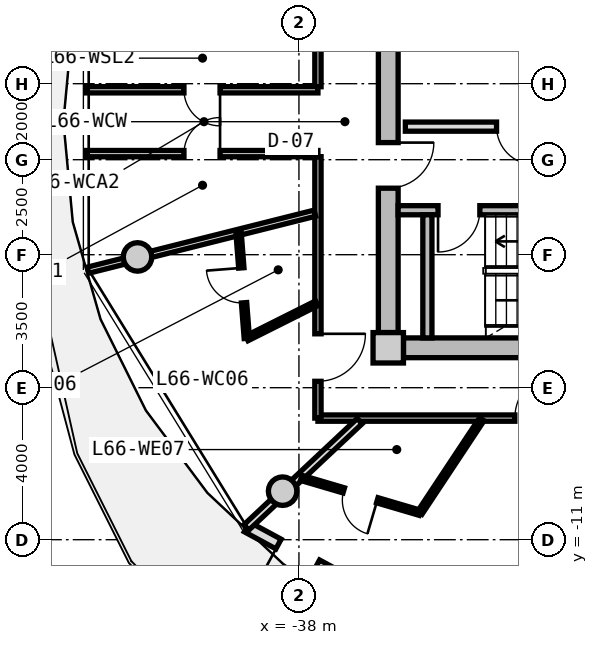
"""IFC4 building model, lengths in metres.
Left out: names, types, materials, properties, quantities, classifications, styles, units other than length and angle.
Written with IfcOpenShell. Run it as: python <this file> out.ifc"""

import sys

from ifc_helpers import new_model, si_unit, direction, frame, frame_2d, origin, origin_2d, place, context, subcontext, project, spatial, rectangle, circle, extrude, source, transform, mapped, element, fill, save


model = new_model("IFC4")
c1 = context("Model", 3, precision=1e-05, world=origin(), true_north=direction((0.0, 1.0)))
c2 = subcontext(c1, "Body", "Model", "MODEL_VIEW")
j1 = project(units=[si_unit("LENGTHUNIT", "METRE"), si_unit("PLANEANGLEUNIT", "RADIAN")], contexts=[c1])
p1 = place(None, origin())
s1 = spatial("IfcSite", under=j1, at=p1, CompositionType="ELEMENT")
p2 = place(p1, origin())
s2 = spatial("IfcBuilding", under=s1, at=p2, CompositionType="ELEMENT")
p3 = place(p2, frame((0.0, 0.0, 213.9)))
s3 = spatial("IfcBuildingStorey", under=s2, at=p3, CompositionType="ELEMENT", Elevation=213.9)
m1 = source(origin(), c2, "Body", "SweptSolid", [
    extrude(rectangle(XDim=0.8, YDim=0.8, at=origin_2d()), origin(), (0.0, 0.0, 1.0), 3.05),
])
p4 = place(p3, frame((-35.65, -5.95, 0.0), z_axis=(0.0, 0.0, 1.0), x_axis=(1.0, 0.0, 0.0)))
e1 = element("IfcColumn", 1, at=p4, inside=s3, PredefinedType="COLUMN", context=c2, shape_type="MappedRepresentation", body=[
    mapped(m1, transform((0.0, 0.0, 0.0), x_axis=(1.0, 0.0, 0.0), y_axis=(0.0, 1.0, 0.0), z_axis=(0.0, 0.0, 1.0), scale=1.0)),
])
m2 = source(origin(), c2, "Body", "SweptSolid", [
    extrude(rectangle(XDim=14.5, YDim=0.52, at=frame_2d((7.25, 0.0))), origin(), (0.0, 0.0, 1.0), 2.76),
])
p5 = place(p3, frame((-20.75, -5.95, 0.0), z_axis=(0.0, 0.0, 1.0), x_axis=(-1.0, 0.0, 0.0)))
e2 = element("IfcWall", 2, at=p5, inside=s3, PredefinedType="SHEAR", context=c2, shape_type="MappedRepresentation", body=[
    mapped(m2, transform((0.0, 0.0, 0.0), x_axis=(1.0, 0.0, 0.0), y_axis=(0.0, 1.0, 0.0), z_axis=(0.0, 0.0, 1.0), scale=1.0)),
])
m3 = source(origin(), c2, "Body", "SweptSolid", [
    extrude(rectangle(XDim=11.1, YDim=0.52, at=frame_2d((5.55, 0.0))), origin(), (0.0, 0.0, 1.0), 2.76),
])
p6 = place(p3, frame((-35.65, -5.55, 0.0), z_axis=(0.0, 0.0, 1.0), x_axis=(0.0, 1.0, 0.0)))
e3 = element("IfcWall", 3, at=p6, inside=s3, PredefinedType="SHEAR", context=c2, shape_type="MappedRepresentation", body=[
    mapped(m3, transform((0.0, 0.0, 0.0), x_axis=(1.0, 0.0, 0.0), y_axis=(0.0, 1.0, 0.0), z_axis=(0.0, 0.0, 1.0), scale=1.0)),
])
p7 = place(p6, frame((3.8, 0.0, 0.0)))
e4 = element("IfcOpeningElement", 4, at=p7, cuts=e3, PredefinedType="OPENING", context=c2, shape_type="SweptSolid", body=[
    extrude(rectangle(XDim=1.2, YDim=2.15, at=frame_2d((0.6, 1.075))), frame((0.0, 0.27, 0.0), z_axis=(0.0, -1.0, 0.0), x_axis=(1.0, 0.0, 0.0)), (0.0, 0.0, 1.0), 0.54),
])
m4 = source(origin(), c2, "Body", "SweptSolid", [
    extrude(circle(Radius=0.375, at=origin_2d()), origin(), (0.0, 0.0, 1.0), 3.05),
])
for number, where, z_axis, x_axis in (
    (5, (-42.247, -3.559, 0.0), (0.0, 0.0, 1.0), (1.0, 0.0, 0.0)),
    (6, (-38.43, -9.723, 0.0), (0.0, 0.0, 1.0), (1.0, 0.0, 0.0)),
):
    element("IfcColumn", number, at=place(p3, frame(where, z_axis=z_axis, x_axis=x_axis)), inside=s3, PredefinedType="COLUMN", context=c2, shape_type="MappedRepresentation", body=[
        mapped(m4, transform((0.0, 0.0, 0.0), x_axis=(1.0, 0.0, 0.0), y_axis=(0.0, 1.0, 0.0), z_axis=(0.0, 0.0, 1.0), scale=1.0)),
    ])
m5 = source(origin(), c2, "Body", "SweptSolid", [
    extrude(rectangle(XDim=8.197, YDim=0.29, at=frame_2d((4.099, 0.0))), origin(), (0.0, 0.0, 1.0), 2.76),
])
p8 = place(p3, frame((-32.162, -14.566, 0.0), z_axis=(0.0, 0.0, 1.0), x_axis=(-0.879369910001, 0.476139224791, 0.0)))
e7 = element("IfcWall", 7, at=p8, inside=s3, PredefinedType="SOLIDWALL", context=c2, shape_type="MappedRepresentation", body=[
    mapped(m5, transform((0.0, 0.0, 0.0), x_axis=(1.0, 0.0, 0.0), y_axis=(0.0, 1.0, 0.0), z_axis=(0.0, 0.0, 1.0), scale=1.0)),
])
p9 = place(p8, frame((6.1, 0.0, 0.0)))
e8 = element("IfcOpeningElement", 8, at=p9, cuts=e7, PredefinedType="OPENING", context=c2, shape_type="SweptSolid", body=[
    extrude(rectangle(XDim=1.15, YDim=2.25, at=frame_2d((0.575, 1.125))), frame((0.0, 0.155, 0.0), z_axis=(0.0, -1.0, 0.0), x_axis=(1.0, 0.0, 0.0)), (0.0, 0.0, 1.0), 0.31),
])
p10 = place(p8, frame((0.85, 0.0, 0.85)))
e9 = element("IfcOpeningElement", 9, at=p10, cuts=e7, PredefinedType="OPENING", context=c2, shape_type="SweptSolid", body=[
    extrude(rectangle(XDim=1.2, YDim=1.5, at=frame_2d((0.6, 0.75))), frame((0.0, 0.155, 0.0), z_axis=(0.0, -1.0, 0.0), x_axis=(1.0, 0.0, 0.0)), (0.0, 0.0, 1.0), 0.31),
])
m6 = source(origin(), c2, "Body", "SweptSolid", [
    extrude(rectangle(XDim=7.93, YDim=0.24, at=frame_2d((3.965, 0.0))), origin(), (0.0, 0.0, 1.0), 2.76),
])
p11 = place(p3, frame((-35.39, -2.33, 0.0), z_axis=(0.0, 0.0, 1.0), x_axis=(1.0, 0.0, 0.0)))
e10 = element("IfcWall", 10, at=p11, inside=s3, PredefinedType="PARTITIONING", context=c2, shape_type="MappedRepresentation", body=[
    mapped(m6, transform((0.0, 0.0, 0.0), x_axis=(1.0, 0.0, 0.0), y_axis=(0.0, 1.0, 0.0), z_axis=(0.0, 0.0, 1.0), scale=1.0)),
])
p12 = place(p11, frame((1.05, 0.0, 0.0)))
e11 = element("IfcOpeningElement", 11, at=p12, cuts=e10, PredefinedType="OPENING", context=c2, shape_type="SweptSolid", body=[
    extrude(rectangle(XDim=1.1, YDim=2.15, at=frame_2d((0.55, 1.075))), frame((0.0, 0.13, 0.0), z_axis=(0.0, -1.0, 0.0), x_axis=(1.0, 0.0, 0.0)), (0.0, 0.0, 1.0), 0.26),
])
m7 = source(origin(), c2, "Body", "SweptSolid", [
    extrude(rectangle(XDim=3.24, YDim=0.24, at=frame_2d((1.62, 0.0))), origin(), (0.0, 0.0, 1.0), 2.76),
])
p13 = place(p3, frame((-34.62, -5.69, 0.0), z_axis=(0.0, 0.0, 1.0), x_axis=(0.0, 1.0, 0.0)))
e12 = element("IfcWall", 12, at=p13, inside=s3, PredefinedType="PARTITIONING", context=c2, shape_type="MappedRepresentation", body=[
    mapped(m7, transform((0.0, 0.0, 0.0), x_axis=(1.0, 0.0, 0.0), y_axis=(0.0, 1.0, 0.0), z_axis=(0.0, 0.0, 1.0), scale=1.0)),
])
m8 = source(origin(), c2, "Body", "SweptSolid", [
    extrude(rectangle(XDim=7.62, YDim=0.24, at=frame_2d((3.81, 0.0))), origin(), (0.0, 0.0, 1.0), 2.745),
])
p14 = place(p3, frame((-35.2, -0.13, 0.0), z_axis=(0.0, 0.0, 1.0), x_axis=(1.0, 0.0, 0.0)))
e13 = element("IfcWall", 13, at=p14, inside=s3, PredefinedType="PARTITIONING", context=c2, shape_type="MappedRepresentation", body=[
    mapped(m8, transform((0.0, 0.0, 0.0), x_axis=(1.0, 0.0, 0.0), y_axis=(0.0, 1.0, 0.0), z_axis=(0.0, 0.0, 1.0), scale=1.0)),
])
p15 = place(p14, frame((6.22, 0.0, 0.0)))
e14 = element("IfcOpeningElement", 14, at=p15, cuts=e13, PredefinedType="OPENING", context=c2, shape_type="SweptSolid", body=[
    extrude(rectangle(XDim=1.0, YDim=2.1, at=frame_2d((0.5, 1.05))), frame((0.0, 0.13, 0.0), z_axis=(0.0, -1.0, 0.0), x_axis=(1.0, 0.0, 0.0)), (0.0, 0.0, 1.0), 0.26),
])
p16 = place(p14, frame((2.4, 0.0, 0.0)))
e15 = element("IfcOpeningElement", 15, at=p16, cuts=e13, PredefinedType="OPENING", context=c2, shape_type="SweptSolid", body=[
    extrude(rectangle(XDim=1.0, YDim=2.1, at=frame_2d((0.5, 1.05))), frame((0.0, 0.13, 0.0), z_axis=(0.0, -1.0, 0.0), x_axis=(1.0, 0.0, 0.0)), (0.0, 0.0, 1.0), 0.26),
])
m9 = source(origin(), c2, "Body", "SweptSolid", [
    extrude(rectangle(XDim=19.0, YDim=0.165, at=frame_2d((9.5, 0.0))), origin(), (0.0, 0.0, 1.0), 2.745),
])
p17 = place(p3, frame((-18.5, -7.8, 0.0), z_axis=(0.0, 0.0, 1.0), x_axis=(-1.0, 0.0, 0.0)))
e16 = element("IfcWall", 16, at=p17, inside=s3, PredefinedType="PARTITIONING", context=c2, shape_type="MappedRepresentation", body=[
    mapped(m9, transform((0.0, 0.0, 0.0), x_axis=(1.0, 0.0, 0.0), y_axis=(0.0, 1.0, 0.0), z_axis=(0.0, 0.0, 1.0), scale=1.0)),
])
p18 = place(p17, frame((12.569, 0.0, 0.0)))
e17 = element("IfcOpeningElement", 17, at=p18, cuts=e16, PredefinedType="OPENING", context=c2, shape_type="SweptSolid", body=[
    extrude(rectangle(XDim=1.25, YDim=2.2, at=frame_2d((0.625, 1.1))), frame((0.0, 0.093, 0.0), z_axis=(0.0, -1.0, 0.0), x_axis=(1.0, 0.0, 0.0)), (0.0, 0.0, 1.0), 0.185),
])
p19 = place(p17, frame((8.875, 0.0, 0.0)))
e18 = element("IfcOpeningElement", 18, at=p19, cuts=e16, PredefinedType="OPENING", context=c2, shape_type="SweptSolid", body=[
    extrude(rectangle(XDim=1.25, YDim=2.2, at=frame_2d((0.625, 1.1))), frame((0.0, 0.093, 0.0), z_axis=(0.0, -1.0, 0.0), x_axis=(1.0, 0.0, 0.0)), (0.0, 0.0, 1.0), 0.185),
])
p20 = place(p17, frame((3.559, 0.0, 0.0)))
e19 = element("IfcOpeningElement", 19, at=p20, cuts=e16, PredefinedType="OPENING", context=c2, shape_type="SweptSolid", body=[
    extrude(rectangle(XDim=1.25, YDim=2.2, at=frame_2d((0.625, 1.1))), frame((0.0, 0.093, 0.0), z_axis=(0.0, -1.0, 0.0), x_axis=(1.0, 0.0, 0.0)), (0.0, 0.0, 1.0), 0.185),
])
m10 = source(origin(), c2, "Body", "SweptSolid", [
    extrude(rectangle(XDim=6.88, YDim=0.165, at=frame_2d((3.44, 0.0))), origin(), (0.0, 0.0, 1.0), 2.745),
])
p21 = place(p3, frame((-37.5, -7.8, 0.0), z_axis=(0.0, 0.0, 1.0), x_axis=(0.0, 1.0, 0.0)))
e20 = element("IfcWall", 20, at=p21, inside=s3, PredefinedType="PARTITIONING", context=c2, shape_type="MappedRepresentation", body=[
    mapped(m10, transform((0.0, 0.0, 0.0), x_axis=(1.0, 0.0, 0.0), y_axis=(0.0, 1.0, 0.0), z_axis=(0.0, 0.0, 1.0), scale=1.0)),
])
p22 = place(p21, frame((0.968, 0.0, 0.0)))
e21 = element("IfcOpeningElement", 21, at=p22, cuts=e20, PredefinedType="OPENING", context=c2, shape_type="SweptSolid", body=[
    extrude(rectangle(XDim=1.25, YDim=2.2, at=frame_2d((0.625, 1.1))), frame((0.0, 0.093, 0.0), z_axis=(0.0, -1.0, 0.0), x_axis=(1.0, 0.0, 0.0)), (0.0, 0.0, 1.0), 0.185),
])
p23 = place(p3, frame((-37.5, 0.92, 0.0), z_axis=(0.0, 0.0, 1.0), x_axis=(0.0, 1.0, 0.0)))
e22 = element("IfcWall", 22, at=p23, inside=s3, PredefinedType="PARTITIONING", context=c2, shape_type="MappedRepresentation", body=[
    mapped(m10, transform((0.0, 0.0, 0.0), x_axis=(1.0, 0.0, 0.0), y_axis=(0.0, 1.0, 0.0), z_axis=(0.0, 0.0, 1.0), scale=1.0)),
])
p24 = place(p23, frame((5.525, 0.0, 0.0)))
e23 = element("IfcOpeningElement", 23, at=p24, cuts=e22, PredefinedType="OPENING", context=c2, shape_type="SweptSolid", body=[
    extrude(rectangle(XDim=0.92, YDim=2.1, at=frame_2d((0.46, 1.05))), frame((0.0, 0.093, 0.0), z_axis=(0.0, -1.0, 0.0), x_axis=(1.0, 0.0, 0.0)), (0.0, 0.0, 1.0), 0.185),
])
p25 = place(p23, frame((2.962, 0.0, 0.0)))
e24 = element("IfcOpeningElement", 24, at=p25, cuts=e22, PredefinedType="OPENING", context=c2, shape_type="SweptSolid", body=[
    extrude(rectangle(XDim=0.92, YDim=2.1, at=frame_2d((0.46, 1.05))), frame((0.0, 0.093, 0.0), z_axis=(0.0, -1.0, 0.0), x_axis=(1.0, 0.0, 0.0)), (0.0, 0.0, 1.0), 0.185),
])
m11 = source(origin(), c2, "Body", "SweptSolid", [
    extrude(rectangle(XDim=6.157, YDim=0.165, at=frame_2d((3.079, 0.0))), origin(), (0.0, 0.0, 1.0), 2.345),
])
p26 = place(p3, frame((-37.58, -2.407, 0.0), z_axis=(0.0, 0.0, 1.0), x_axis=(-0.969840867184, -0.243738984038, 0.0)))
e25 = element("IfcWall", 25, at=p26, inside=s3, PredefinedType="PARTITIONING", context=c2, shape_type="MappedRepresentation", body=[
    mapped(m11, transform((0.0, 0.0, 0.0), x_axis=(1.0, 0.0, 0.0), y_axis=(0.0, 1.0, 0.0), z_axis=(0.0, 0.0, 1.0), scale=1.0)),
])
m12 = source(origin(), c2, "Body", "SweptSolid", [
    extrude(rectangle(XDim=6.101, YDim=0.165, at=frame_2d((3.051, 0.0))), origin(), (0.0, 0.0, 1.0), 2.745),
])
p27 = place(p3, frame((-43.601, 0.84, 0.0), z_axis=(0.0, 0.0, 1.0), x_axis=(1.0, 0.0, 0.0)))
e26 = element("IfcWall", 26, at=p27, inside=s3, PredefinedType="PARTITIONING", context=c2, shape_type="MappedRepresentation", body=[
    mapped(m12, transform((0.0, 0.0, 0.0), x_axis=(1.0, 0.0, 0.0), y_axis=(0.0, 1.0, 0.0), z_axis=(0.0, 0.0, 1.0), scale=1.0)),
])
p28 = place(p27, frame((2.576, 0.0, 0.0)))
e27 = element("IfcOpeningElement", 27, at=p28, cuts=e26, PredefinedType="OPENING", context=c2, shape_type="SweptSolid", body=[
    extrude(rectangle(XDim=0.95, YDim=2.1, at=frame_2d((0.475, 1.05))), frame((0.0, 0.093, 0.0), z_axis=(0.0, -1.0, 0.0), x_axis=(1.0, 0.0, 0.0)), (0.0, 0.0, 1.0), 0.185),
])
p29 = place(p3, frame((-37.5, -0.84, 0.0), z_axis=(0.0, 0.0, 1.0), x_axis=(-1.0, 0.0, 0.0)))
e28 = element("IfcWall", 28, at=p29, inside=s3, PredefinedType="PARTITIONING", context=c2, shape_type="MappedRepresentation", body=[
    mapped(m12, transform((0.0, 0.0, 0.0), x_axis=(1.0, 0.0, 0.0), y_axis=(0.0, 1.0, 0.0), z_axis=(0.0, 0.0, 1.0), scale=1.0)),
])
p30 = place(p29, frame((2.576, 0.0, 0.0)))
e29 = element("IfcOpeningElement", 29, at=p30, cuts=e28, PredefinedType="OPENING", context=c2, shape_type="SweptSolid", body=[
    extrude(rectangle(XDim=0.95, YDim=2.1, at=frame_2d((0.475, 1.05))), frame((0.0, 0.093, 0.0), z_axis=(0.0, -1.0, 0.0), x_axis=(1.0, 0.0, 0.0)), (0.0, 0.0, 1.0), 0.185),
])
m13 = source(origin(), c2, "Body", "SweptSolid", [
    extrude(rectangle(XDim=4.089, YDim=0.19, at=frame_2d((2.044, 0.0))), origin(), (0.0, 0.0, 1.0), 2.345),
])
p31 = place(p3, frame((-36.402, -7.88, 0.0), z_axis=(0.0, 0.0, 1.0), x_axis=(-0.729401273609, -0.684086092577, 0.0)))
e30 = element("IfcWall", 30, at=p31, inside=s3, PredefinedType="PARTITIONING", context=c2, shape_type="MappedRepresentation", body=[
    mapped(m13, transform((0.0, 0.0, 0.0), x_axis=(1.0, 0.0, 0.0), y_axis=(0.0, 1.0, 0.0), z_axis=(0.0, 0.0, 1.0), scale=1.0)),
])
m14 = source(origin(), c2, "Body", "SweptSolid", [
    extrude(rectangle(XDim=2.06, YDim=0.14, at=frame_2d((1.03, 0.0))), origin(), (0.0, 0.0, 1.0), 2.745),
])
p32 = place(p3, frame((-37.53, -4.778, 0.0), z_axis=(0.0, 0.0, 1.0), x_axis=(-0.893952568722, -0.448161583444, 0.0)))
e31 = element("IfcWall", 31, at=p32, inside=s3, PredefinedType="PARTITIONING", context=c2, shape_type="MappedRepresentation", body=[
    mapped(m14, transform((0.0, 0.0, 0.0), x_axis=(1.0, 0.0, 0.0), y_axis=(0.0, 1.0, 0.0), z_axis=(0.0, 0.0, 1.0), scale=1.0)),
])
m15 = source(origin(), c2, "Body", "SweptSolid", [
    extrude(rectangle(XDim=2.798, YDim=0.14, at=frame_2d((1.399, 0.0))), origin(), (0.0, 0.0, 1.0), 2.745),
])
p33 = place(p3, frame((-39.371, -5.701, 0.0), z_axis=(0.0, 0.0, 1.0), x_axis=(-0.077823984089, 0.996967114553, 0.0)))
e32 = element("IfcWall", 32, at=p33, inside=s3, PredefinedType="PARTITIONING", context=c2, shape_type="MappedRepresentation", body=[
    mapped(m15, transform((0.0, 0.0, 0.0), x_axis=(1.0, 0.0, 0.0), y_axis=(0.0, 1.0, 0.0), z_axis=(0.0, 0.0, 1.0), scale=1.0)),
])
p34 = place(p33, frame((0.939, 0.0, 0.0)))
e33 = element("IfcOpeningElement", 33, at=p34, cuts=e32, PredefinedType="OPENING", context=c2, shape_type="SweptSolid", body=[
    extrude(rectangle(XDim=0.92, YDim=2.1, at=frame_2d((0.46, 1.05))), frame((0.0, 0.08, 0.0), z_axis=(0.0, -1.0, 0.0), x_axis=(1.0, 0.0, 0.0)), (0.0, 0.0, 1.0), 0.16),
])
m16 = source(origin(), c2, "Body", "SweptSolid", [
    extrude(rectangle(XDim=6.974, YDim=0.19, at=frame_2d((3.487, 0.0))), origin(), (0.0, 0.0, 1.0), 2.345),
])
p35 = place(p3, frame((-30.251, -7.88, 0.0), z_axis=(0.0, 0.0, 1.0), x_axis=(-0.274707256801, -0.961527910703, 0.0)))
e34 = element("IfcWall", 34, at=p35, inside=s3, PredefinedType="PARTITIONING", context=c2, shape_type="MappedRepresentation", body=[
    mapped(m16, transform((0.0, 0.0, 0.0), x_axis=(1.0, 0.0, 0.0), y_axis=(0.0, 1.0, 0.0), z_axis=(0.0, 0.0, 1.0), scale=1.0)),
])
m17 = source(origin(), c2, "Body", "SweptSolid", [
    extrude(rectangle(XDim=2.953, YDim=0.14, at=frame_2d((1.476, 0.0))), origin(), (0.0, 0.0, 1.0), 2.745),
])
p36 = place(p3, frame((-33.188, -7.83, 0.0), z_axis=(0.0, 0.0, 1.0), x_axis=(-0.552427436518, -0.833560991999, 0.0)))
e35 = element("IfcWall", 35, at=p36, inside=s3, PredefinedType="PARTITIONING", context=c2, shape_type="MappedRepresentation", body=[
    mapped(m17, transform((0.0, 0.0, 0.0), x_axis=(1.0, 0.0, 0.0), y_axis=(0.0, 1.0, 0.0), z_axis=(0.0, 0.0, 1.0), scale=1.0)),
])
m18 = source(origin(), c2, "Body", "SweptSolid", [
    extrude(rectangle(XDim=3.252, YDim=0.14, at=frame_2d((1.626, 0.0))), origin(), (0.0, 0.0, 1.0), 2.745),
])
p37 = place(p3, frame((-34.82, -10.291, 0.0), z_axis=(0.0, 0.0, 1.0), x_axis=(-0.959294945864, 0.282406102695, 0.0)))
e36 = element("IfcWall", 36, at=p37, inside=s3, PredefinedType="PARTITIONING", context=c2, shape_type="MappedRepresentation", body=[
    mapped(m18, transform((0.0, 0.0, 0.0), x_axis=(1.0, 0.0, 0.0), y_axis=(0.0, 1.0, 0.0), z_axis=(0.0, 0.0, 1.0), scale=1.0)),
])
p38 = place(p37, frame((1.166, 0.0, 0.0)))
e37 = element("IfcOpeningElement", 37, at=p38, cuts=e36, PredefinedType="OPENING", context=c2, shape_type="SweptSolid", body=[
    extrude(rectangle(XDim=0.92, YDim=2.1, at=frame_2d((0.46, 1.05))), frame((0.0, 0.08, 0.0), z_axis=(0.0, -1.0, 0.0), x_axis=(1.0, 0.0, 0.0)), (0.0, 0.0, 1.0), 0.16),
])
m19 = source(origin(), c2, "Body", "SweptSolid", [
    extrude(rectangle(XDim=1.15, YDim=2.25, at=frame_2d((0.575, 1.125))), frame((0.0, 0.025, 0.0), z_axis=(0.0, -1.0, 0.0), x_axis=(1.0, 0.0, 0.0)), (0.0, 0.0, 1.0), 0.05),
])
p39 = place(p9, origin())
e38 = element("IfcDoor", 38, at=p39, inside=s3, OperationType="SINGLE_SWING_RIGHT", PredefinedType="DOOR", context=c2, shape_type="MappedRepresentation", body=[
    mapped(m19, transform((0.0, 0.0, 0.0), x_axis=(1.0, 0.0, 0.0), y_axis=(0.0, 1.0, 0.0), z_axis=(0.0, 0.0, 1.0), scale=1.0)),
])
fill(e8, e38)
m20 = source(origin(), c2, "Body", "SweptSolid", [
    extrude(rectangle(XDim=1.1, YDim=2.15, at=frame_2d((0.55, 1.075))), frame((0.0, 0.025, 0.0), z_axis=(0.0, -1.0, 0.0), x_axis=(1.0, 0.0, 0.0)), (0.0, 0.0, 1.0), 0.05),
])
p40 = place(p12, frame((1.1, 0.0, 0.0), z_axis=(0.0, 0.0, 1.0), x_axis=(-1.0, 0.0, 0.0)))
e39 = element("IfcDoor", 39, at=p40, inside=s3, OperationType="SINGLE_SWING_RIGHT", PredefinedType="DOOR", context=c2, shape_type="MappedRepresentation", body=[
    mapped(m20, transform((0.0, 0.0, 0.0), x_axis=(1.0, 0.0, 0.0), y_axis=(0.0, 1.0, 0.0), z_axis=(0.0, 0.0, 1.0), scale=1.0)),
])
fill(e11, e39)
m21 = source(origin(), c2, "Body", "SweptSolid", [
    extrude(rectangle(XDim=1.2, YDim=2.15, at=frame_2d((0.6, 1.075))), frame((0.0, 0.025, 0.0), z_axis=(0.0, -1.0, 0.0), x_axis=(1.0, 0.0, 0.0)), (0.0, 0.0, 1.0), 0.05),
])
p41 = place(p7, frame((1.2, 0.0, 0.0), z_axis=(0.0, 0.0, 1.0), x_axis=(-1.0, 0.0, 0.0)))
e40 = element("IfcDoor", 40, at=p41, inside=s3, OperationType="SINGLE_SWING_LEFT", PredefinedType="DOOR", context=c2, shape_type="MappedRepresentation", body=[
    mapped(m21, transform((0.0, 0.0, 0.0), x_axis=(1.0, 0.0, 0.0), y_axis=(0.0, 1.0, 0.0), z_axis=(0.0, 0.0, 1.0), scale=1.0)),
])
fill(e4, e40)
m22 = source(origin(), c2, "Body", "SweptSolid", [
    extrude(rectangle(XDim=1.0, YDim=2.1, at=frame_2d((0.5, 1.05))), frame((0.0, 0.025, 0.0), z_axis=(0.0, -1.0, 0.0), x_axis=(1.0, 0.0, 0.0)), (0.0, 0.0, 1.0), 0.05),
])
p42 = place(p16, frame((1.0, 0.0, 0.0), z_axis=(0.0, 0.0, 1.0), x_axis=(-1.0, 0.0, 0.0)))
e41 = element("IfcDoor", 41, at=p42, inside=s3, OperationType="SINGLE_SWING_LEFT", PredefinedType="DOOR", context=c2, shape_type="MappedRepresentation", body=[
    mapped(m22, transform((0.0, 0.0, 0.0), x_axis=(1.0, 0.0, 0.0), y_axis=(0.0, 1.0, 0.0), z_axis=(0.0, 0.0, 1.0), scale=1.0)),
])
fill(e15, e41)
m23 = source(origin(), c2, "Body", "SweptSolid", [
    extrude(rectangle(XDim=0.95, YDim=2.1, at=frame_2d((0.475, 1.05))), frame((0.0, 0.025, 0.0), z_axis=(0.0, -1.0, 0.0), x_axis=(1.0, 0.0, 0.0)), (0.0, 0.0, 1.0), 0.05),
])
p43 = place(p30, frame((0.95, 0.0, 0.0), z_axis=(0.0, 0.0, 1.0), x_axis=(-1.0, 0.0, 0.0)))
e42 = element("IfcDoor", 42, at=p43, inside=s3, OperationType="SINGLE_SWING_RIGHT", PredefinedType="DOOR", context=c2, shape_type="MappedRepresentation", body=[
    mapped(m23, transform((0.0, 0.0, 0.0), x_axis=(1.0, 0.0, 0.0), y_axis=(0.0, 1.0, 0.0), z_axis=(0.0, 0.0, 1.0), scale=1.0)),
])
fill(e29, e42)
p44 = place(p28, frame((0.95, 0.0, 0.0), z_axis=(0.0, 0.0, 1.0), x_axis=(-1.0, 0.0, 0.0)))
e43 = element("IfcDoor", 43, at=p44, inside=s3, OperationType="SINGLE_SWING_LEFT", PredefinedType="DOOR", context=c2, shape_type="MappedRepresentation", body=[
    mapped(m23, transform((0.0, 0.0, 0.0), x_axis=(1.0, 0.0, 0.0), y_axis=(0.0, 1.0, 0.0), z_axis=(0.0, 0.0, 1.0), scale=1.0)),
])
fill(e27, e43)
m24 = source(origin(), c2, "Body", "SweptSolid", [
    extrude(rectangle(XDim=1.25, YDim=2.2, at=frame_2d((0.625, 1.1))), frame((0.0, 0.025, 0.0), z_axis=(0.0, -1.0, 0.0), x_axis=(1.0, 0.0, 0.0)), (0.0, 0.0, 1.0), 0.05),
])
p45 = place(p22, frame((1.25, 0.0, 0.0), z_axis=(0.0, 0.0, 1.0), x_axis=(-1.0, 0.0, 0.0)))
e44 = element("IfcDoor", 44, at=p45, inside=s3, OperationType="SINGLE_SWING_LEFT", PredefinedType="DOOR", context=c2, shape_type="MappedRepresentation", body=[
    mapped(m24, transform((0.0, 0.0, 0.0), x_axis=(1.0, 0.0, 0.0), y_axis=(0.0, 1.0, 0.0), z_axis=(0.0, 0.0, 1.0), scale=1.0)),
])
fill(e21, e44)
m25 = source(origin(), c2, "Body", "SweptSolid", [
    extrude(rectangle(XDim=0.92, YDim=2.1, at=frame_2d((0.46, 1.05))), frame((0.0, 0.025, 0.0), z_axis=(0.0, -1.0, 0.0), x_axis=(1.0, 0.0, 0.0)), (0.0, 0.0, 1.0), 0.05),
])
p46 = place(p34, origin())
e45 = element("IfcDoor", 45, at=p46, inside=s3, OperationType="SINGLE_SWING_RIGHT", PredefinedType="DOOR", context=c2, shape_type="MappedRepresentation", body=[
    mapped(m25, transform((0.0, 0.0, 0.0), x_axis=(1.0, 0.0, 0.0), y_axis=(0.0, 1.0, 0.0), z_axis=(0.0, 0.0, 1.0), scale=1.0)),
])
fill(e33, e45)
p47 = place(p18, frame((1.25, 0.0, 0.0), z_axis=(0.0, 0.0, 1.0), x_axis=(-1.0, 0.0, 0.0)))
e46 = element("IfcDoor", 46, at=p47, inside=s3, OperationType="SINGLE_SWING_RIGHT", PredefinedType="DOOR", context=c2, shape_type="MappedRepresentation", body=[
    mapped(m24, transform((0.0, 0.0, 0.0), x_axis=(1.0, 0.0, 0.0), y_axis=(0.0, 1.0, 0.0), z_axis=(0.0, 0.0, 1.0), scale=1.0)),
])
fill(e17, e46)
p48 = place(p38, origin())
e47 = element("IfcDoor", 47, at=p48, inside=s3, OperationType="SINGLE_SWING_LEFT", PredefinedType="DOOR", context=c2, shape_type="MappedRepresentation", body=[
    mapped(m25, transform((0.0, 0.0, 0.0), x_axis=(1.0, 0.0, 0.0), y_axis=(0.0, 1.0, 0.0), z_axis=(0.0, 0.0, 1.0), scale=1.0)),
])
fill(e37, e47)
save(model, sys.argv[1])
